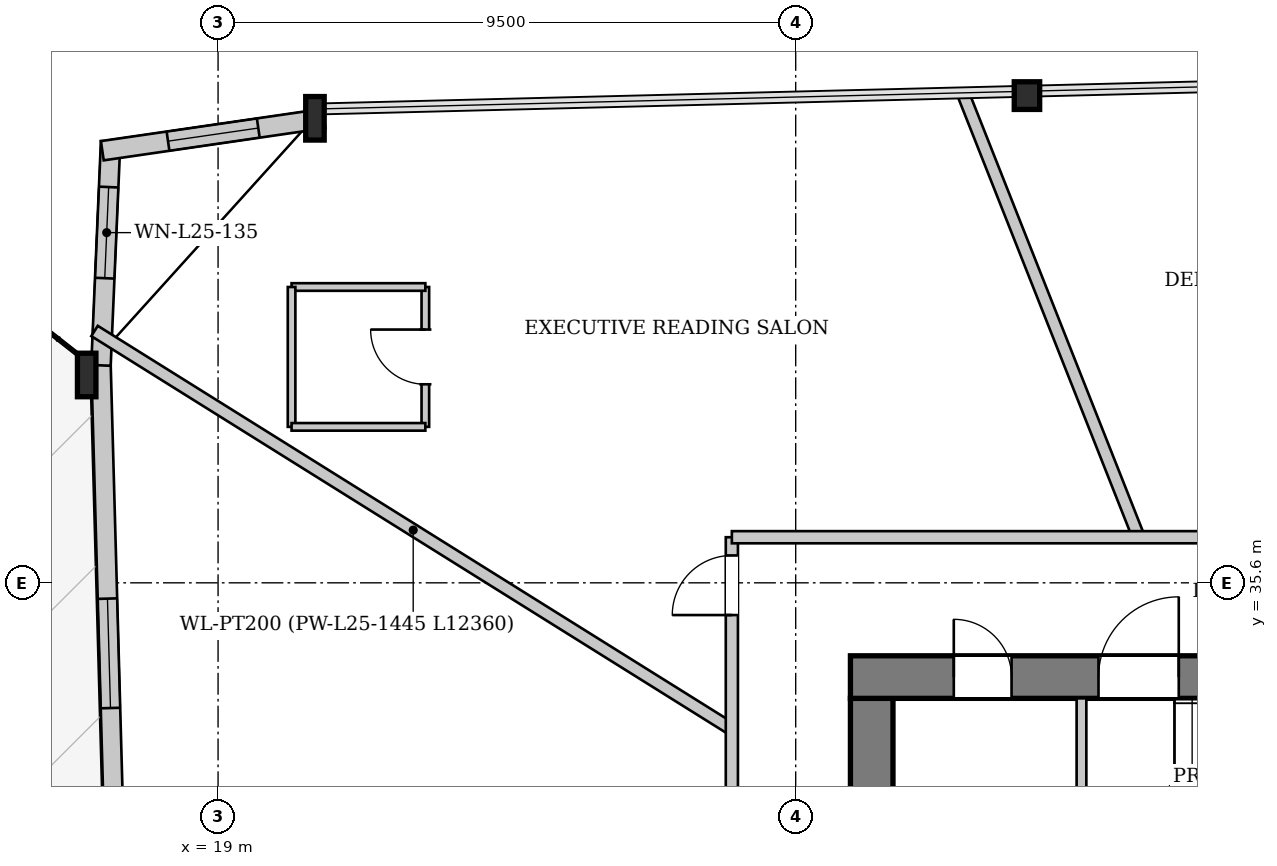
"""IFC4 building model, lengths in metres.
Left out: names, types, materials, properties, quantities, classifications, styles, units other than length and angle.
Written with IfcOpenShell. Run it as: python <this file> out.ifc"""

import sys

from ifc_helpers import new_model, si_unit, direction, frame, frame_2d, origin, origin_2d, place, context, subcontext, project, spatial, rectangle, i_section, extrude, source, transform, mapped, element, fill, save


model = new_model("IFC4")
c1 = context("Model", 3, precision=1e-05, world=origin(), true_north=direction((0.0, 1.0)))
c2 = subcontext(c1, "Body", "Model", "MODEL_VIEW")
j1 = project(units=[si_unit("LENGTHUNIT", "METRE"), si_unit("PLANEANGLEUNIT", "RADIAN")], contexts=[c1])
p1 = place(None, origin())
s1 = spatial("IfcSite", under=j1, at=p1, CompositionType="ELEMENT")
p2 = place(p1, origin())
s2 = spatial("IfcBuilding", under=s1, at=p2, CompositionType="ELEMENT")
p3 = place(p2, frame((0.0, 0.0, 98.6)))
s3 = spatial("IfcBuildingStorey", under=s2, at=p3, CompositionType="ELEMENT", Elevation=98.6)
m1 = source(origin(), c2, "Body", "SweptSolid", [
    extrude(i_section(OverallWidth=0.418, OverallDepth=0.455, WebThickness=0.038, FlangeThickness=0.059, at=origin_2d()), origin(), (0.0, 0.0, 1.0), 3.399),
])
p4 = place(p3, frame((32.44, 43.688, 0.0), z_axis=(-0.080295380378, -0.044169641263, 0.995791993682), x_axis=(0.481978917969, -0.876182813478, 0.0)))
e1 = element("IfcColumn", 1, at=p4, inside=s3, PredefinedType="COLUMN", context=c2, shape_type="MappedRepresentation", body=[
    mapped(m1, transform((0.0, 0.0, 0.0), x_axis=(1.0, 0.0, 0.0), y_axis=(0.0, 1.0, 0.0), z_axis=(0.0, 0.0, 1.0), scale=1.0)),
])
m2 = source(origin(), c2, "Body", "SweptSolid", [
    extrude(i_section(OverallWidth=0.304, OverallDepth=0.716, WebThickness=0.021, FlangeThickness=0.04, at=origin_2d()), origin(), (0.0, 0.0, 1.0), 3.409),
])
p5 = place(p3, frame((20.719, 43.395, 0.0), z_axis=(-0.0739887365, -0.091178762405, 0.993082121558), x_axis=(0.776505673312, -0.630110259648, 0.0)))
e2 = element("IfcColumn", 2, at=p5, inside=s3, PredefinedType="COLUMN", context=c2, shape_type="MappedRepresentation", body=[
    mapped(m2, transform((0.0, 0.0, 0.0), x_axis=(1.0, 0.0, 0.0), y_axis=(0.0, 1.0, 0.0), z_axis=(0.0, 0.0, 1.0), scale=1.0)),
])
m3 = source(origin(), c2, "Body", "SweptSolid", [
    extrude(i_section(OverallWidth=0.304, OverallDepth=0.716, WebThickness=0.021, FlangeThickness=0.04, at=origin_2d()), origin(), (0.0, 0.0, 1.0), 3.404),
])
p6 = place(p3, frame((16.914, 39.183, 0.0), z_axis=(-0.044103945942, -0.096956967339, 0.994310911354), x_axis=(0.910251157425, -0.414056554598, 0.0)))
e3 = element("IfcColumn", 3, at=p6, inside=s3, PredefinedType="COLUMN", context=c2, shape_type="MappedRepresentation", body=[
    mapped(m3, transform((0.0, 0.0, 0.0), x_axis=(1.0, 0.0, 0.0), y_axis=(0.0, 1.0, 0.0), z_axis=(0.0, 0.0, 1.0), scale=1.0)),
])
p7 = place(p3, frame((17.58, 20.931, 0.0), z_axis=(0.0, 0.0, 1.0), x_axis=(-0.027670598931, 0.99961709567, 0.0)))
e4 = element("IfcWall", 4, at=p7, inside=s3, PredefinedType="SOLIDWALL", context=c2, shape_type="SweptSolid", body=[
    extrude(rectangle(XDim=18.264, YDim=0.32, at=frame_2d((9.132, 0.0))), origin(), (0.0, 0.0, 1.0), 2.692),
])
p8 = place(p7, frame((5.294, 0.0, 0.0)))
e5 = element("IfcOpeningElement", 5, at=p8, cuts=e4, PredefinedType="OPENING", context=c2, shape_type="SweptSolid", body=[
    extrude(rectangle(XDim=1.1, YDim=2.3, at=frame_2d((0.55, 1.15))), frame((0.0, 0.17, 0.0), z_axis=(0.0, -1.0, 0.0), x_axis=(1.0, 0.0, 0.0)), (0.0, 0.0, 1.0), 0.34),
])
p9 = place(p7, frame((12.615, 0.0, 0.372)))
e6 = element("IfcOpeningElement", 6, at=p9, cuts=e4, PredefinedType="OPENING", context=c2, shape_type="SweptSolid", body=[
    extrude(rectangle(XDim=1.8, YDim=2.2, at=frame_2d((0.9, 1.1))), frame((0.0, 0.17, 0.0), z_axis=(0.0, -1.0, 0.0), x_axis=(1.0, 0.0, 0.0)), (0.0, 0.0, 1.0), 0.34),
])
p10 = place(p3, frame((17.074, 39.176, 0.0), z_axis=(0.0, 0.0, 1.0), x_axis=(0.043135301437, 0.999069239728, 0.0)))
e7 = element("IfcWall", 7, at=p10, inside=s3, PredefinedType="SOLIDWALL", context=c2, shape_type="SweptSolid", body=[
    extrude(rectangle(XDim=3.685, YDim=0.32, at=frame_2d((1.842, 0.0))), origin(), (0.0, 0.0, 1.0), 2.692),
])
p11 = place(p10, frame((1.435, 0.0, 0.272)))
e8 = element("IfcOpeningElement", 8, at=p11, cuts=e7, PredefinedType="OPENING", context=c2, shape_type="SweptSolid", body=[
    extrude(rectangle(XDim=1.5, YDim=2.3, at=frame_2d((0.75, 1.15))), frame((0.0, 0.17, 0.0), z_axis=(0.0, -1.0, 0.0), x_axis=(1.0, 0.0, 0.0)), (0.0, 0.0, 1.0), 0.34),
])
p12 = place(p3, frame((17.096, 42.706, 0.0), z_axis=(0.0, 0.0, 1.0), x_axis=(0.989589871041, 0.143916250412, 0.0)))
e9 = element("IfcWall", 9, at=p12, inside=s3, PredefinedType="SOLIDWALL", context=c2, shape_type="SweptSolid", body=[
    extrude(rectangle(XDim=3.685, YDim=0.32, at=frame_2d((1.842, 0.0))), origin(), (0.0, 0.0, 1.0), 2.692),
])
p13 = place(p12, frame((1.092, 0.0, 0.272)))
e10 = element("IfcOpeningElement", 10, at=p13, cuts=e9, PredefinedType="OPENING", context=c2, shape_type="SweptSolid", body=[
    extrude(rectangle(XDim=1.5, YDim=2.3, at=frame_2d((0.75, 1.15))), frame((0.0, 0.17, 0.0), z_axis=(0.0, -1.0, 0.0), x_axis=(1.0, 0.0, 0.0)), (0.0, 0.0, 1.0), 0.34),
])
p14 = place(p3, frame((29.75, 19.5, 0.0), z_axis=(0.0, 0.0, 1.0), x_axis=(0.0, 1.0, 0.0)))
e11 = element("IfcWall", 11, at=p14, inside=s3, PredefinedType="SHEAR", context=c2, shape_type="SweptSolid", body=[
    extrude(rectangle(XDim=14.2, YDim=0.7, at=frame_2d((7.1, 0.0))), origin(), (0.0, 0.0, 1.0), 3.3),
])
p15 = place(p14, frame((7.42, 0.0, 0.0)))
e12 = element("IfcOpeningElement", 12, at=p15, cuts=e11, PredefinedType="OPENING", context=c2, shape_type="SweptSolid", body=[
    extrude(rectangle(XDim=1.6, YDim=2.2, at=frame_2d((0.8, 1.1))), frame((0.0, 0.36, 0.0), z_axis=(0.0, -1.0, 0.0), x_axis=(1.0, 0.0, 0.0)), (0.0, 0.0, 1.0), 0.72),
])
p16 = place(p3, frame((29.4, 34.05, 0.0), z_axis=(0.0, 0.0, 1.0), x_axis=(1.0, 0.0, 0.0)))
e13 = element("IfcWall", 13, at=p16, inside=s3, PredefinedType="SHEAR", context=c2, shape_type="SweptSolid", body=[
    extrude(rectangle(XDim=17.2, YDim=0.7, at=frame_2d((8.6, 0.0))), origin(), (0.0, 0.0, 1.0), 3.3),
])
p17 = place(p16, frame((1.7, 0.0, 0.0)))
e14 = element("IfcOpeningElement", 14, at=p17, cuts=e13, PredefinedType="OPENING", context=c2, shape_type="SweptSolid", body=[
    extrude(rectangle(XDim=0.95, YDim=2.1, at=frame_2d((0.475, 1.05))), frame((0.0, 0.36, 0.0), z_axis=(0.0, -1.0, 0.0), x_axis=(1.0, 0.0, 0.0)), (0.0, 0.0, 1.0), 0.72),
])
p18 = place(p16, frame((4.08, 0.0, 0.0)))
e15 = element("IfcOpeningElement", 15, at=p18, cuts=e13, PredefinedType="OPENING", context=c2, shape_type="SweptSolid", body=[
    extrude(rectangle(XDim=1.32, YDim=2.2, at=frame_2d((0.66, 1.1))), frame((0.0, 0.36, 0.0), z_axis=(0.0, -1.0, 0.0), x_axis=(1.0, 0.0, 0.0)), (0.0, 0.0, 1.0), 0.72),
])
p19 = place(p16, frame((15.15, 0.0, 0.0)))
e16 = element("IfcOpeningElement", 16, at=p19, cuts=e13, PredefinedType="OPENING", context=c2, shape_type="SweptSolid", body=[
    extrude(rectangle(XDim=0.95, YDim=2.1, at=frame_2d((0.475, 1.05))), frame((0.0, 0.36, 0.0), z_axis=(0.0, -1.0, 0.0), x_axis=(1.0, 0.0, 0.0)), (0.0, 0.0, 1.0), 0.72),
])
p20 = place(p3, frame((33.2, 28.44, 0.0), z_axis=(0.0, 0.0, 1.0), x_axis=(0.0, 1.0, 0.0)))
e17 = element("IfcWall", 17, at=p20, inside=s3, PredefinedType="PARTITIONING", context=c2, shape_type="SweptSolid", body=[
    extrude(rectangle(XDim=5.26, YDim=0.16, at=frame_2d((2.63, 0.0))), origin(), (0.0, 0.0, 1.0), 3.3),
])
p21 = place(p3, frame((27.45, 33.192, 0.0), z_axis=(0.0, 0.0, 1.0), x_axis=(-0.848047128699, 0.529920812485, 0.0)))
e18 = element("IfcWall", 18, at=p21, inside=s3, PredefinedType="PARTITIONING", context=c2, shape_type="SweptSolid", body=[
    extrude(rectangle(XDim=12.36, YDim=0.2, at=frame_2d((6.18, 0.0))), origin(), (0.0, 0.0, 1.0), 3.3),
])
p22 = place(p3, frame((34.141, 36.35, 0.0), z_axis=(0.0, 0.0, 1.0), x_axis=(-0.368043395043, 0.929808614375, 0.0)))
e19 = element("IfcWall", 19, at=p22, inside=s3, PredefinedType="PARTITIONING", context=c2, shape_type="SweptSolid", body=[
    extrude(rectangle(XDim=7.827, YDim=0.2, at=frame_2d((3.914, 0.0))), origin(), (0.0, 0.0, 1.0), 3.3),
])
p23 = place(p3, frame((22.409, 38.165, 0.0), z_axis=(0.0, 0.0, 1.0), x_axis=(0.0, 1.0, 0.0)))
e20 = element("IfcWall", 20, at=p23, inside=s3, PredefinedType="PARTITIONING", context=c2, shape_type="SweptSolid", body=[
    extrude(rectangle(XDim=2.3, YDim=0.125, at=frame_2d((1.15, 0.0))), origin(), (0.0, 0.0, 1.0), 3.3),
])
p24 = place(p23, frame((0.7, 0.0, 0.0)))
e21 = element("IfcOpeningElement", 21, at=p24, cuts=e20, PredefinedType="OPENING", context=c2, shape_type="SweptSolid", body=[
    extrude(rectangle(XDim=0.9, YDim=2.1, at=frame_2d((0.45, 1.05))), frame((0.0, 0.073, 0.0), z_axis=(0.0, -1.0, 0.0), x_axis=(1.0, 0.0, 0.0)), (0.0, 0.0, 1.0), 0.145),
])
p25 = place(p3, frame((22.409, 40.465, 0.0), z_axis=(0.0, 0.0, 1.0), x_axis=(-1.0, 0.0, 0.0)))
e22 = element("IfcWall", 22, at=p25, inside=s3, PredefinedType="PARTITIONING", context=c2, shape_type="SweptSolid", body=[
    extrude(rectangle(XDim=2.2, YDim=0.125, at=frame_2d((1.1, 0.0))), origin(), (0.0, 0.0, 1.0), 3.3),
])
p26 = place(p3, frame((20.209, 40.465, 0.0), z_axis=(0.0, 0.0, 1.0), x_axis=(0.0, -1.0, 0.0)))
e23 = element("IfcWall", 23, at=p26, inside=s3, PredefinedType="PARTITIONING", context=c2, shape_type="SweptSolid", body=[
    extrude(rectangle(XDim=2.3, YDim=0.125, at=frame_2d((1.15, 0.0))), origin(), (0.0, 0.0, 1.0), 3.3),
])
p27 = place(p3, frame((20.209, 38.165, 0.0), z_axis=(0.0, 0.0, 1.0), x_axis=(1.0, 0.0, 0.0)))
e24 = element("IfcWall", 24, at=p27, inside=s3, PredefinedType="PARTITIONING", context=c2, shape_type="SweptSolid", body=[
    extrude(rectangle(XDim=2.2, YDim=0.125, at=frame_2d((1.1, 0.0))), origin(), (0.0, 0.0, 1.0), 3.3),
])
p28 = place(p3, frame((27.45, 16.85, 0.0), z_axis=(0.0, 0.0, 1.0), x_axis=(0.0, 1.0, 0.0)))
e25 = element("IfcWall", 25, at=p28, inside=s3, PredefinedType="PARTITIONING", context=c2, shape_type="SweptSolid", body=[
    extrude(rectangle(XDim=19.5, YDim=0.2, at=frame_2d((9.75, 0.0))), origin(), (0.0, 0.0, 1.0), 3.3),
])
p29 = place(p28, frame((18.22, 0.0, 0.0)))
e26 = element("IfcOpeningElement", 26, at=p29, cuts=e25, PredefinedType="OPENING", context=c2, shape_type="SweptSolid", body=[
    extrude(rectangle(XDim=0.98, YDim=2.15, at=frame_2d((0.49, 1.075))), frame((0.0, 0.11, 0.0), z_axis=(0.0, -1.0, 0.0), x_axis=(1.0, 0.0, 0.0)), (0.0, 0.0, 1.0), 0.22),
])
p30 = place(p3, frame((27.45, 36.35, 0.0), z_axis=(0.0, 0.0, 1.0), x_axis=(1.0, 0.0, 0.0)))
e27 = element("IfcWall", 27, at=p30, inside=s3, PredefinedType="PARTITIONING", context=c2, shape_type="SweptSolid", body=[
    extrude(rectangle(XDim=21.1, YDim=0.2, at=frame_2d((10.55, 0.0))), origin(), (0.0, 0.0, 1.0), 3.3),
])
p31 = place(p30, frame((19.82, 0.0, 0.0)))
e28 = element("IfcOpeningElement", 28, at=p31, cuts=e27, PredefinedType="OPENING", context=c2, shape_type="SweptSolid", body=[
    extrude(rectangle(XDim=0.98, YDim=2.15, at=frame_2d((0.49, 1.075))), frame((0.0, 0.11, 0.0), z_axis=(0.0, -1.0, 0.0), x_axis=(1.0, 0.0, 0.0)), (0.0, 0.0, 1.0), 0.22),
])
p32 = place(p30, frame((8.782, 0.0, 0.0)))
e29 = element("IfcOpeningElement", 29, at=p32, cuts=e27, PredefinedType="OPENING", context=c2, shape_type="SweptSolid", body=[
    extrude(rectangle(XDim=0.98, YDim=2.15, at=frame_2d((0.49, 1.075))), frame((0.0, 0.11, 0.0), z_axis=(0.0, -1.0, 0.0), x_axis=(1.0, 0.0, 0.0)), (0.0, 0.0, 1.0), 0.22),
])
m4 = source(origin(), c2, "Body", "SweptSolid", [
    extrude(rectangle(XDim=1.8, YDim=2.2, at=frame_2d((0.9, 1.1))), frame((0.0, 0.03, 0.0), z_axis=(0.0, -1.0, 0.0), x_axis=(1.0, 0.0, 0.0)), (0.0, 0.0, 1.0), 0.06),
])
p33 = place(p9, origin())
e30 = element("IfcWindow", 30, at=p33, inside=s3, PartitioningType="SINGLE_PANEL", PredefinedType="WINDOW", context=c2, shape_type="MappedRepresentation", body=[
    mapped(m4, transform((0.0, 0.0, 0.0), x_axis=(1.0, 0.0, 0.0), y_axis=(0.0, 1.0, 0.0), z_axis=(0.0, 0.0, 1.0), scale=1.0)),
])
fill(e6, e30)
m5 = source(origin(), c2, "Body", "SweptSolid", [
    extrude(rectangle(XDim=1.5, YDim=2.3, at=frame_2d((0.75, 1.15))), frame((0.0, 0.03, 0.0), z_axis=(0.0, -1.0, 0.0), x_axis=(1.0, 0.0, 0.0)), (0.0, 0.0, 1.0), 0.06),
])
p34 = place(p11, origin())
e31 = element("IfcWindow", 31, at=p34, inside=s3, PartitioningType="SINGLE_PANEL", PredefinedType="WINDOW", context=c2, shape_type="MappedRepresentation", body=[
    mapped(m5, transform((0.0, 0.0, 0.0), x_axis=(1.0, 0.0, 0.0), y_axis=(0.0, 1.0, 0.0), z_axis=(0.0, 0.0, 1.0), scale=1.0)),
])
fill(e8, e31)
p35 = place(p13, origin())
e32 = element("IfcWindow", 32, at=p35, inside=s3, PartitioningType="SINGLE_PANEL", PredefinedType="WINDOW", context=c2, shape_type="MappedRepresentation", body=[
    mapped(m5, transform((0.0, 0.0, 0.0), x_axis=(1.0, 0.0, 0.0), y_axis=(0.0, 1.0, 0.0), z_axis=(0.0, 0.0, 1.0), scale=1.0)),
])
fill(e10, e32)
m6 = source(origin(), c2, "Body", "SweptSolid", [
    extrude(rectangle(XDim=0.95, YDim=2.1, at=frame_2d((0.475, 1.05))), frame((0.0, 0.025, 0.0), z_axis=(0.0, -1.0, 0.0), x_axis=(1.0, 0.0, 0.0)), (0.0, 0.0, 1.0), 0.05),
])
p36 = place(p17, origin())
e33 = element("IfcDoor", 33, at=p36, inside=s3, OperationType="SINGLE_SWING_LEFT", PredefinedType="DOOR", context=c2, shape_type="MappedRepresentation", body=[
    mapped(m6, transform((0.0, 0.0, 0.0), x_axis=(1.0, 0.0, 0.0), y_axis=(0.0, 1.0, 0.0), z_axis=(0.0, 0.0, 1.0), scale=1.0)),
])
fill(e14, e33)
m7 = source(origin(), c2, "Body", "SweptSolid", [
    extrude(rectangle(XDim=1.32, YDim=2.2, at=frame_2d((0.66, 1.1))), frame((0.0, 0.025, 0.0), z_axis=(0.0, -1.0, 0.0), x_axis=(1.0, 0.0, 0.0)), (0.0, 0.0, 1.0), 0.05),
])
p37 = place(p18, origin())
e34 = element("IfcDoor", 34, at=p37, inside=s3, OperationType="SINGLE_SWING_RIGHT", PredefinedType="DOOR", context=c2, shape_type="MappedRepresentation", body=[
    mapped(m7, transform((0.0, 0.0, 0.0), x_axis=(1.0, 0.0, 0.0), y_axis=(0.0, 1.0, 0.0), z_axis=(0.0, 0.0, 1.0), scale=1.0)),
])
fill(e15, e34)
m8 = source(origin(), c2, "Body", "SweptSolid", [
    extrude(rectangle(XDim=0.9, YDim=2.1, at=frame_2d((0.45, 1.05))), frame((0.0, 0.025, 0.0), z_axis=(0.0, -1.0, 0.0), x_axis=(1.0, 0.0, 0.0)), (0.0, 0.0, 1.0), 0.05),
])
p38 = place(p24, origin())
e35 = element("IfcDoor", 35, at=p38, inside=s3, OperationType="SINGLE_SWING_RIGHT", PredefinedType="DOOR", context=c2, shape_type="MappedRepresentation", body=[
    mapped(m8, transform((0.0, 0.0, 0.0), x_axis=(1.0, 0.0, 0.0), y_axis=(0.0, 1.0, 0.0), z_axis=(0.0, 0.0, 1.0), scale=1.0)),
])
fill(e21, e35)
m9 = source(origin(), c2, "Body", "SweptSolid", [
    extrude(rectangle(XDim=0.98, YDim=2.15, at=frame_2d((0.49, 1.075))), frame((0.0, 0.025, 0.0), z_axis=(0.0, -1.0, 0.0), x_axis=(1.0, 0.0, 0.0)), (0.0, 0.0, 1.0), 0.05),
])
p39 = place(p29, origin())
e36 = element("IfcDoor", 36, at=p39, inside=s3, OperationType="SINGLE_SWING_LEFT", PredefinedType="DOOR", context=c2, shape_type="MappedRepresentation", body=[
    mapped(m9, transform((0.0, 0.0, 0.0), x_axis=(1.0, 0.0, 0.0), y_axis=(0.0, 1.0, 0.0), z_axis=(0.0, 0.0, 1.0), scale=1.0)),
])
fill(e26, e36)
save(model, sys.argv[1])
